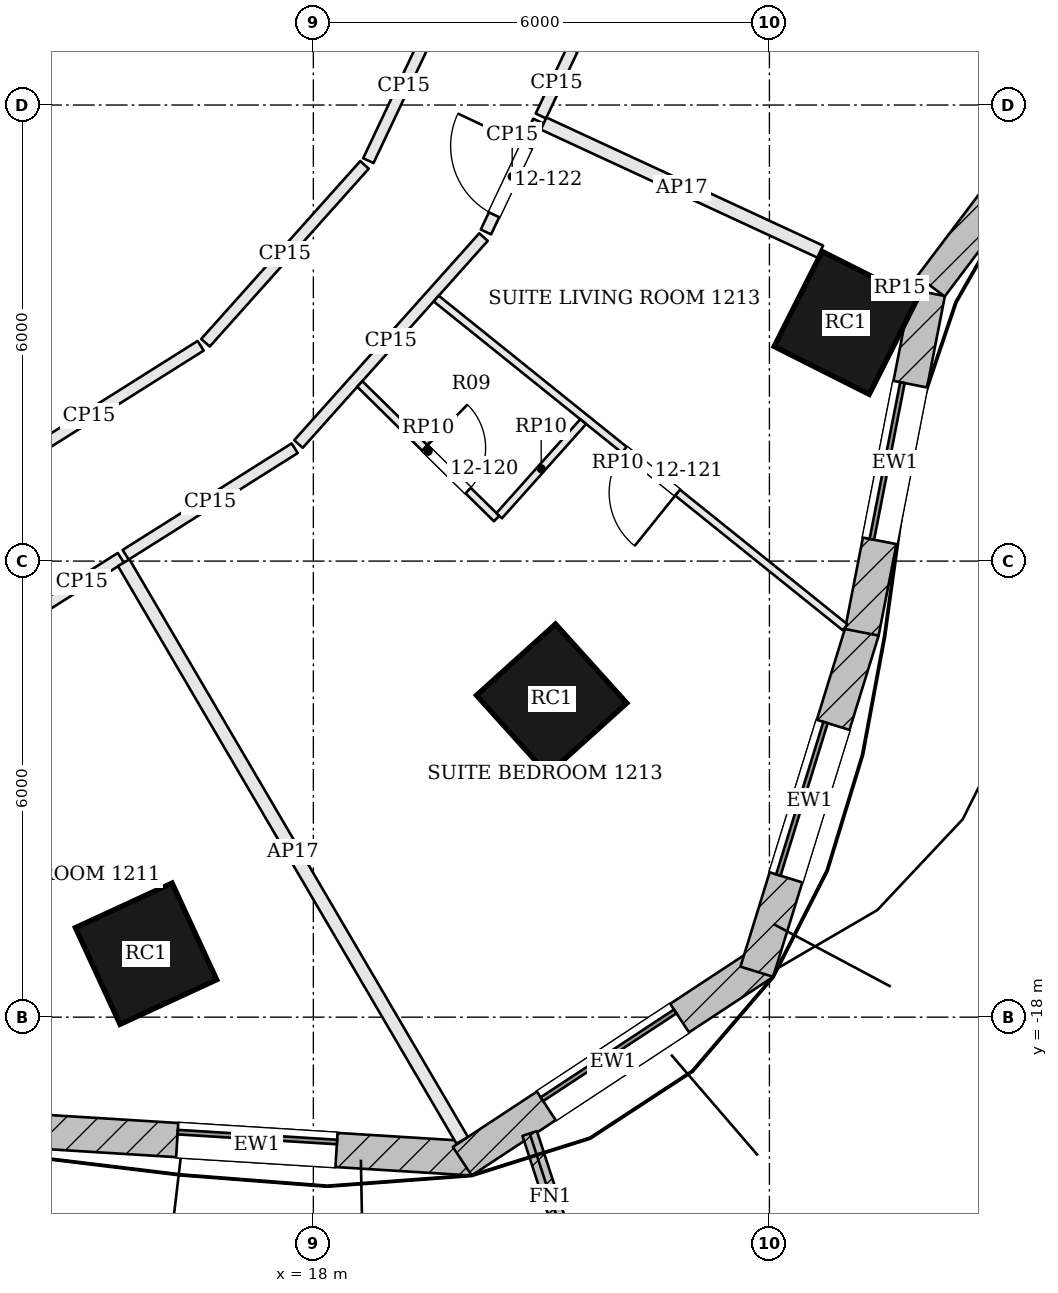
"""IFC4 building model, lengths in metres.
Left out: names, types, materials, properties, quantities, classifications, styles, units other than length and angle.
Written with IfcOpenShell. Run it as: python <this file> out.ifc"""

import sys

from ifc_helpers import new_model, si_unit, direction, frame, frame_2d, origin, origin_2d, place, context, subcontext, project, spatial, rectangle, extrude, element, fill, save


model = new_model("IFC4")
c1 = context("Model", 3, precision=1e-05, world=origin(), true_north=direction((0.0, 1.0)))
c2 = subcontext(c1, "Body", "Model", "MODEL_VIEW")
j1 = project(units=[si_unit("LENGTHUNIT", "METRE"), si_unit("PLANEANGLEUNIT", "RADIAN")], contexts=[c1])
p1 = place(None, origin())
s1 = spatial("IfcSite", under=j1, at=p1, CompositionType="ELEMENT")
p2 = place(p1, origin())
s2 = spatial("IfcBuilding", under=s1, at=p2, CompositionType="ELEMENT")
p3 = place(p2, frame((0.0, 0.0, 59.1)))
s3 = spatial("IfcBuildingStorey", under=s2, at=p3, CompositionType="ELEMENT", Elevation=59.1)
for number, where, z_axis, x_axis in (
    (1, (15.799, -17.165, 0.0), (0.0, 0.0, 1.0), (0.908, 0.419, 0.0)),
    (2, (21.135, -13.817, 0.0), (0.0, 0.0, 1.0), (0.743, 0.67, 0.0)),
    (3, (25.003, -8.866, 0.0), (0.0, 0.0, 1.0), (0.45, 0.893, 0.0)),
):
    element("IfcColumn", number, at=place(p3, frame(where, z_axis=z_axis, x_axis=x_axis)), inside=s3, PredefinedType="COLUMN", context=c2, shape_type="SweptSolid", body=[
        extrude(rectangle(XDim=1.4, YDim=1.4, at=origin_2d()), origin(), (0.0, 0.0, 1.0), 3.6),
    ])
p4 = place(p3, frame((14.421, -19.506, 0.0), z_axis=(0.0, 0.0, 1.0), x_axis=(0.998078573447, -0.06196096534, 0.0)))
e4 = element("IfcWall", 4, at=p4, inside=s3, PredefinedType="SOLIDWALL", context=c2, shape_type="SweptSolid", body=[
    extrude(rectangle(XDim=5.682, YDim=0.45, at=frame_2d((2.841, 0.0))), origin(), (0.0, 0.0, 1.0), 3.4),
])
p5 = place(p4, frame((1.791, 0.0, 0.9)))
e5 = element("IfcOpeningElement", 5, at=p5, cuts=e4, PredefinedType="OPENING", context=c2, shape_type="SweptSolid", body=[
    extrude(rectangle(XDim=2.1, YDim=2.0, at=frame_2d((1.05, 1.0))), frame((0.0, 0.235, 0.0), z_axis=(0.0, -1.0, 0.0), x_axis=(1.0, 0.0, 0.0)), (0.0, 0.0, 1.0), 0.47),
])
p6 = place(p3, frame((19.959, -19.895, 0.0), z_axis=(0.0, 0.0, 1.0), x_axis=(0.835201398752, 0.549944200372, 0.0)))
e6 = element("IfcWall", 6, at=p6, inside=s3, PredefinedType="SOLIDWALL", context=c2, shape_type="SweptSolid", body=[
    extrude(rectangle(XDim=4.748, YDim=0.45, at=frame_2d((2.374, 0.0))), origin(), (0.0, 0.0, 1.0), 3.4),
])
p7 = place(p6, frame((1.324, 0.0, 0.9)))
e7 = element("IfcOpeningElement", 7, at=p7, cuts=e6, PredefinedType="OPENING", context=c2, shape_type="SweptSolid", body=[
    extrude(rectangle(XDim=2.1, YDim=2.0, at=frame_2d((1.05, 1.0))), frame((0.0, 0.235, 0.0), z_axis=(0.0, -1.0, 0.0), x_axis=(1.0, 0.0, 0.0)), (0.0, 0.0, 1.0), 0.47),
])
p8 = place(p3, frame((23.834, -17.402, 0.0), z_axis=(0.0, 0.0, 1.0), x_axis=(0.2954658114, 0.955353313855, 0.0)))
e8 = element("IfcWall", 8, at=p8, inside=s3, PredefinedType="SOLIDWALL", context=c2, shape_type="SweptSolid", body=[
    extrude(rectangle(XDim=4.698, YDim=0.45, at=frame_2d((2.349, 0.0))), origin(), (0.0, 0.0, 1.0), 3.4),
])
p9 = place(p8, frame((1.299, 0.0, 0.9)))
e9 = element("IfcOpeningElement", 9, at=p9, cuts=e8, PredefinedType="OPENING", context=c2, shape_type="SweptSolid", body=[
    extrude(rectangle(XDim=2.1, YDim=2.0, at=frame_2d((1.05, 1.0))), frame((0.0, 0.235, 0.0), z_axis=(0.0, -1.0, 0.0), x_axis=(1.0, 0.0, 0.0)), (0.0, 0.0, 1.0), 0.47),
])
p10 = place(p3, frame((25.216, -12.936, 0.0), z_axis=(0.0, 0.0, 1.0), x_axis=(0.191564556994, 0.981480015336, 0.0)))
e10 = element("IfcWall", 10, at=p10, inside=s3, PredefinedType="SOLIDWALL", context=c2, shape_type="SweptSolid", body=[
    extrude(rectangle(XDim=4.551, YDim=0.45, at=frame_2d((2.275, 0.0))), origin(), (0.0, 0.0, 1.0), 3.4),
])
p11 = place(p10, frame((1.226, 0.0, 0.9)))
e11 = element("IfcOpeningElement", 11, at=p11, cuts=e10, PredefinedType="OPENING", context=c2, shape_type="SweptSolid", body=[
    extrude(rectangle(XDim=2.1, YDim=2.0, at=frame_2d((1.05, 1.0))), frame((0.0, 0.235, 0.0), z_axis=(0.0, -1.0, 0.0), x_axis=(1.0, 0.0, 0.0)), (0.0, 0.0, 1.0), 0.47),
])
p12 = place(p3, frame((26.126, -8.384, 0.0), z_axis=(0.0, 0.0, 1.0), x_axis=(0.602408101465, 0.798188248028, 0.0)))
e12 = element("IfcWall", 12, at=p12, inside=s3, PredefinedType="SOLIDWALL", context=c2, shape_type="SweptSolid", body=[
    extrude(rectangle(XDim=4.909, YDim=0.45, at=frame_2d((2.455, 0.0))), origin(), (0.0, 0.0, 1.0), 3.4),
])
p13 = place(p12, frame((1.405, 0.0, 0.9)))
e13 = element("IfcOpeningElement", 13, at=p13, cuts=e12, PredefinedType="OPENING", context=c2, shape_type="SweptSolid", body=[
    extrude(rectangle(XDim=2.1, YDim=2.0, at=frame_2d((1.05, 1.0))), frame((0.0, 0.235, 0.0), z_axis=(0.0, -1.0, 0.0), x_axis=(1.0, 0.0, 0.0)), (0.0, 0.0, 1.0), 0.47),
])
p14 = place(p3, frame((20.846, -19.53, 0.0), z_axis=(0.0, 0.0, 1.0), x_axis=(0.309732726603, -0.950823662974, 0.0)))
e14 = element("IfcWall", 14, at=p14, inside=s3, PredefinedType="SOLIDWALL", context=c2, shape_type="SweptSolid", body=[
    extrude(rectangle(XDim=1.75, YDim=0.2, at=frame_2d((0.875, 0.0))), origin(), (0.0, 0.0, 1.0), 3.4),
])
p15 = place(p3, frame((14.442, -12.603, 0.0), z_axis=(0.0, 0.0, 1.0), x_axis=(0.845976983642, 0.533219413701, 0.0)))
e15 = element("IfcWall", 15, at=p15, inside=s3, PredefinedType="PARTITIONING", context=c2, shape_type="SweptSolid", body=[
    extrude(rectangle(XDim=1.211, YDim=0.15, at=frame_2d((0.606, 0.0))), origin(), (0.0, 0.0, 1.0), 2.68),
])
p16 = place(p3, frame((19.958, -19.62, 0.0), z_axis=(0.0, 0.0, 1.0), x_axis=(-0.505643381875, 0.862742586387, 0.0)))
e16 = element("IfcWall", 16, at=p16, inside=s3, PredefinedType="PARTITIONING", context=c2, shape_type="SweptSolid", body=[
    extrude(rectangle(XDim=8.808, YDim=0.175, at=frame_2d((4.404, 0.0))), origin(), (0.0, 0.0, 1.0), 2.68),
])
p17 = place(p3, frame((15.531, -11.917, 0.0), z_axis=(0.0, 0.0, 1.0), x_axis=(0.84600940038, 0.533167979598, 0.0)))
e17 = element("IfcWall", 17, at=p17, inside=s3, PredefinedType="PARTITIONING", context=c2, shape_type="SweptSolid", body=[
    extrude(rectangle(XDim=2.628, YDim=0.15, at=frame_2d((1.314, 0.0))), origin(), (0.0, 0.0, 1.0), 2.68),
])
p18 = place(p3, frame((17.804, -10.46, 0.0), z_axis=(0.0, 0.0, 1.0), x_axis=(0.666597463623, 0.745417883802, 0.0)))
e18 = element("IfcWall", 18, at=p18, inside=s3, PredefinedType="PARTITIONING", context=c2, shape_type="SweptSolid", body=[
    extrude(rectangle(XDim=3.652, YDim=0.15, at=frame_2d((1.826, 0.0))), origin(), (0.0, 0.0, 1.0), 2.68),
])
p19 = place(p3, frame((20.271, -7.67, 0.0), z_axis=(0.0, 0.0, 1.0), x_axis=(0.42804079978, 0.903759411416, 0.0)))
e19 = element("IfcWall", 19, at=p19, inside=s3, PredefinedType="PARTITIONING", context=c2, shape_type="SweptSolid", body=[
    extrude(rectangle(XDim=1.613, YDim=0.15, at=frame_2d((0.807, 0.0))), origin(), (0.0, 0.0, 1.0), 2.68),
])
p20 = place(p19, frame((0.25, 0.0, 0.0)))
e20 = element("IfcOpeningElement", 20, at=p20, cuts=e19, PredefinedType="OPENING", context=c2, shape_type="SweptSolid", body=[
    extrude(rectangle(XDim=1.0, YDim=2.1, at=frame_2d((0.5, 1.05))), frame((0.0, 0.085, 0.0), z_axis=(0.0, -1.0, 0.0), x_axis=(1.0, 0.0, 0.0)), (0.0, 0.0, 1.0), 0.17),
])
p21 = place(p3, frame((25.857, -8.479, 0.0), z_axis=(0.0, 0.0, 1.0), x_axis=(-0.90750010164, 0.420051860517, 0.0)))
e21 = element("IfcWall", 21, at=p21, inside=s3, PredefinedType="PARTITIONING", context=c2, shape_type="SweptSolid", body=[
    extrude(rectangle(XDim=0.312, YDim=0.15, at=frame_2d((0.156, 0.0))), origin(), (0.0, 0.0, 1.0), 3.4),
])
p22 = place(p3, frame((24.669, -7.929, 0.0), z_axis=(0.0, 0.0, 1.0), x_axis=(-0.907461750658, 0.420134705888, 0.0)))
e22 = element("IfcWall", 22, at=p22, inside=s3, PredefinedType="PARTITIONING", context=c2, shape_type="SweptSolid", body=[
    extrude(rectangle(XDim=4.011, YDim=0.175, at=frame_2d((2.006, 0.0))), origin(), (0.0, 0.0, 1.0), 2.68),
])
p23 = place(p3, frame((20.993, -6.144, 0.0), z_axis=(0.0, 0.0, 1.0), x_axis=(0.42784789947, 0.903850748143, 0.0)))
e23 = element("IfcWall", 23, at=p23, inside=s3, PredefinedType="PARTITIONING", context=c2, shape_type="SweptSolid", body=[
    extrude(rectangle(XDim=0.968, YDim=0.15, at=frame_2d((0.484, 0.0))), origin(), (0.0, 0.0, 1.0), 2.68),
])
p24 = place(p3, frame((19.655, -4.763, 0.0), z_axis=(0.0, 0.0, 1.0), x_axis=(-0.427965880464, -0.903794891089, 0.0)))
e24 = element("IfcWall", 24, at=p24, inside=s3, PredefinedType="PARTITIONING", context=c2, shape_type="SweptSolid", body=[
    extrude(rectangle(XDim=2.178, YDim=0.15, at=frame_2d((1.089, 0.0))), origin(), (0.0, 0.0, 1.0), 2.68),
])
p25 = place(p3, frame((18.673, -6.788, 0.0), z_axis=(0.0, 0.0, 1.0), x_axis=(-0.666610670036, -0.745406073623, 0.0)))
e25 = element("IfcWall", 25, at=p25, inside=s3, PredefinedType="PARTITIONING", context=c2, shape_type="SweptSolid", body=[
    extrude(rectangle(XDim=3.139, YDim=0.15, at=frame_2d((1.569, 0.0))), origin(), (0.0, 0.0, 1.0), 2.68),
])
p26 = place(p3, frame((16.517, -9.167, 0.0), z_axis=(0.0, 0.0, 1.0), x_axis=(-0.846000117603, -0.533182708849, 0.0)))
e26 = element("IfcWall", 26, at=p26, inside=s3, PredefinedType="PARTITIONING", context=c2, shape_type="SweptSolid", body=[
    extrude(rectangle(XDim=3.47, YDim=0.15, at=frame_2d((1.735, 0.0))), origin(), (0.0, 0.0, 1.0), 2.68),
])
p27 = place(p3, frame((24.996, -12.871, 0.0), z_axis=(0.0, 0.0, 1.0), x_axis=(-0.779382782797, 0.626548065099, 0.0)))
e27 = element("IfcWall", 27, at=p27, inside=s3, PredefinedType="PARTITIONING", context=c2, shape_type="SweptSolid", body=[
    extrude(rectangle(XDim=6.902, YDim=0.1, at=frame_2d((3.451, 0.0))), origin(), (0.0, 0.0, 1.0), 2.898),
])
p28 = place(p27, frame((2.828, 0.0, 0.0)))
e28 = element("IfcOpeningElement", 28, at=p28, cuts=e27, PredefinedType="OPENING", context=c2, shape_type="SweptSolid", body=[
    extrude(rectangle(XDim=0.9, YDim=2.4, at=frame_2d((0.45, 1.2))), frame((0.0, 0.06, 0.0), z_axis=(0.0, -1.0, 0.0), x_axis=(1.0, 0.0, 0.0)), (0.0, 0.0, 1.0), 0.12),
])
p29 = place(p3, frame((18.611, -9.67, 0.0), z_axis=(0.0, 0.0, 1.0), x_axis=(0.712836736893, -0.701330012573, 0.0)))
e29 = element("IfcWall", 29, at=p29, inside=s3, PredefinedType="PARTITIONING", context=c2, shape_type="SweptSolid", body=[
    extrude(rectangle(XDim=2.525, YDim=0.1, at=frame_2d((1.262, 0.0))), origin(), (0.0, 0.0, 1.0), 2.898),
])
p30 = place(p29, frame((1.2, 0.0, 0.0)))
e30 = element("IfcOpeningElement", 30, at=p30, cuts=e29, PredefinedType="OPENING", context=c2, shape_type="SweptSolid", body=[
    extrude(rectangle(XDim=0.8, YDim=2.1, at=frame_2d((0.4, 1.05))), frame((0.0, 0.06, 0.0), z_axis=(0.0, -1.0, 0.0), x_axis=(1.0, 0.0, 0.0)), (0.0, 0.0, 1.0), 0.12),
])
p31 = place(p3, frame((20.444, -11.403, 0.0), z_axis=(0.0, 0.0, 1.0), x_axis=(0.666369249882, 0.745621903388, 0.0)))
e31 = element("IfcWall", 31, at=p31, inside=s3, PredefinedType="PARTITIONING", context=c2, shape_type="SweptSolid", body=[
    extrude(rectangle(XDim=1.66, YDim=0.1, at=frame_2d((0.83, 0.0))), origin(), (0.0, 0.0, 1.0), 2.898),
])
p32 = place(p5, origin())
e32 = element("IfcWindow", 32, at=p32, inside=s3, PartitioningType="SINGLE_PANEL", PredefinedType="WINDOW", context=c2, shape_type="SweptSolid", body=[
    extrude(rectangle(XDim=2.1, YDim=2.0, at=frame_2d((1.05, 1.0))), frame((0.0, 0.135, 0.0), z_axis=(0.0, -1.0, 0.0), x_axis=(1.0, 0.0, 0.0)), (0.0, 0.0, 1.0), 0.06),
])
fill(e5, e32)
p33 = place(p7, origin())
e33 = element("IfcWindow", 33, at=p33, inside=s3, PartitioningType="SINGLE_PANEL", PredefinedType="WINDOW", context=c2, shape_type="SweptSolid", body=[
    extrude(rectangle(XDim=2.1, YDim=2.0, at=frame_2d((1.05, 1.0))), frame((0.0, 0.135, 0.0), z_axis=(0.0, -1.0, 0.0), x_axis=(1.0, 0.0, 0.0)), (0.0, 0.0, 1.0), 0.06),
])
fill(e7, e33)
p34 = place(p9, origin())
e34 = element("IfcWindow", 34, at=p34, inside=s3, PartitioningType="SINGLE_PANEL", PredefinedType="WINDOW", context=c2, shape_type="SweptSolid", body=[
    extrude(rectangle(XDim=2.1, YDim=2.0, at=frame_2d((1.05, 1.0))), frame((0.0, 0.135, 0.0), z_axis=(0.0, -1.0, 0.0), x_axis=(1.0, 0.0, 0.0)), (0.0, 0.0, 1.0), 0.06),
])
fill(e9, e34)
p35 = place(p11, origin())
e35 = element("IfcWindow", 35, at=p35, inside=s3, PartitioningType="SINGLE_PANEL", PredefinedType="WINDOW", context=c2, shape_type="SweptSolid", body=[
    extrude(rectangle(XDim=2.1, YDim=2.0, at=frame_2d((1.05, 1.0))), frame((0.0, 0.135, 0.0), z_axis=(0.0, -1.0, 0.0), x_axis=(1.0, 0.0, 0.0)), (0.0, 0.0, 1.0), 0.06),
])
fill(e11, e35)
p36 = place(p30, origin())
e36 = element("IfcDoor", 36, at=p36, inside=s3, OperationType="SINGLE_SWING_LEFT", PredefinedType="DOOR", context=c2, shape_type="SweptSolid", body=[
    extrude(rectangle(XDim=0.8, YDim=2.1, at=frame_2d((0.4, 1.05))), frame((0.0, 0.025, 0.0), z_axis=(0.0, -1.0, 0.0), x_axis=(1.0, 0.0, 0.0)), (0.0, 0.0, 1.0), 0.05),
])
fill(e30, e36)
p37 = place(p28, origin())
e37 = element("IfcDoor", 37, at=p37, inside=s3, OperationType="SINGLE_SWING_LEFT", PredefinedType="DOOR", context=c2, shape_type="SweptSolid", body=[
    extrude(rectangle(XDim=0.9, YDim=2.4, at=frame_2d((0.45, 1.2))), frame((0.0, 0.025, 0.0), z_axis=(0.0, -1.0, 0.0), x_axis=(1.0, 0.0, 0.0)), (0.0, 0.0, 1.0), 0.05),
])
fill(e28, e37)
p38 = place(p20, origin())
e38 = element("IfcDoor", 38, at=p38, inside=s3, OperationType="SINGLE_SWING_RIGHT", PredefinedType="DOOR", context=c2, shape_type="SweptSolid", body=[
    extrude(rectangle(XDim=1.0, YDim=2.1, at=frame_2d((0.5, 1.05))), frame((0.0, 0.025, 0.0), z_axis=(0.0, -1.0, 0.0), x_axis=(1.0, 0.0, 0.0)), (0.0, 0.0, 1.0), 0.05),
])
fill(e20, e38)
save(model, sys.argv[1])
